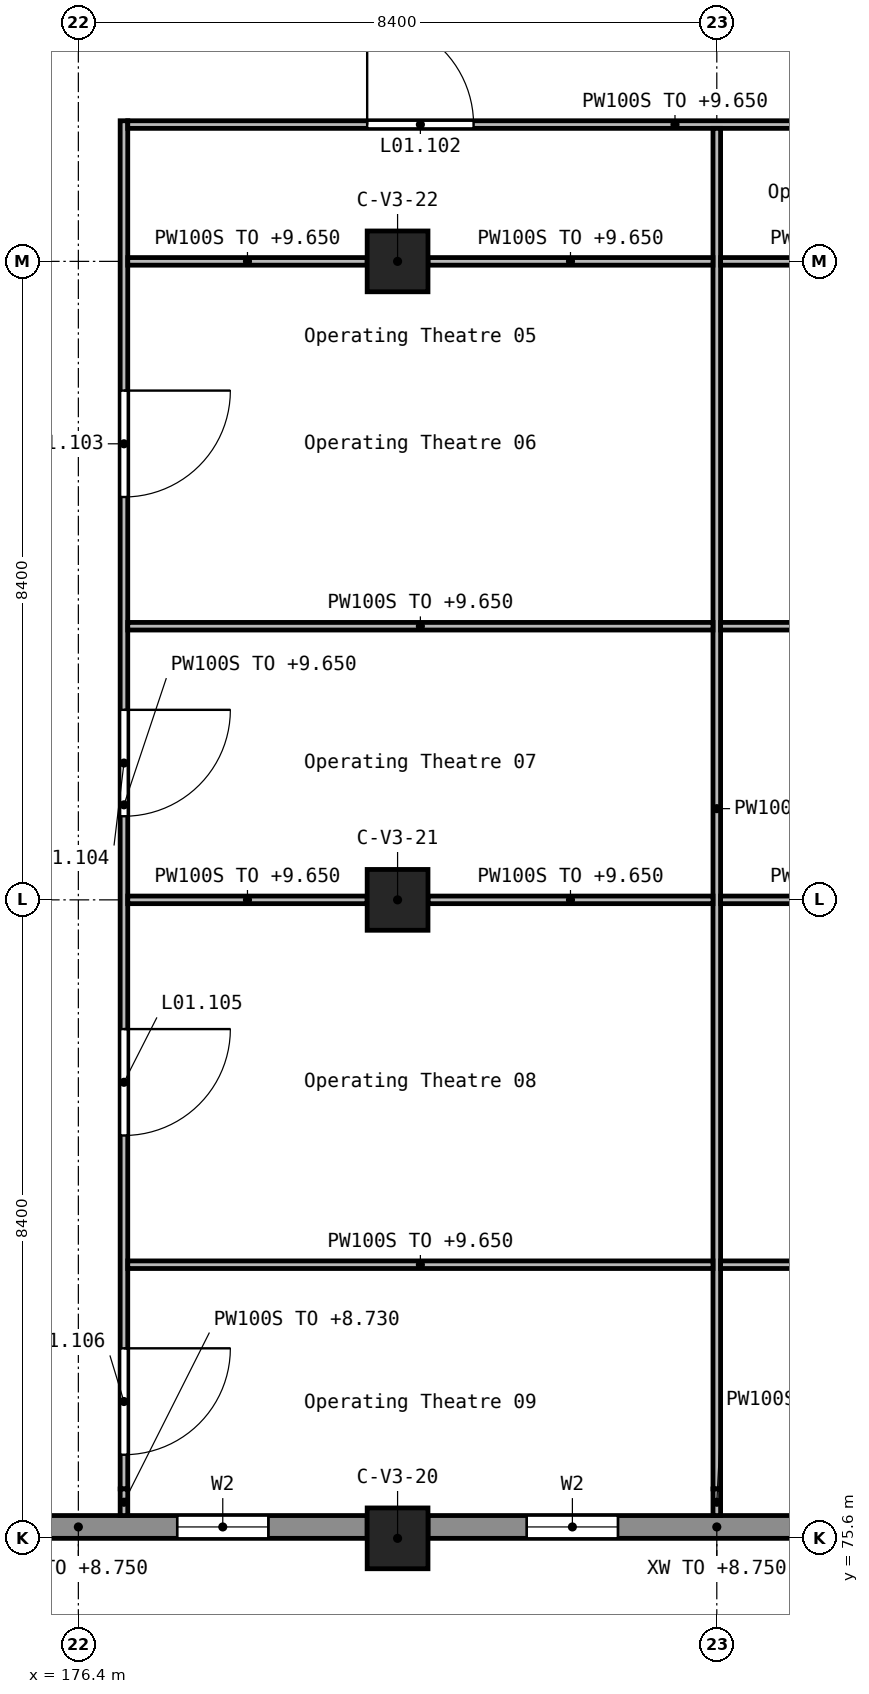
"""IFC4 building model, lengths in metres.
Left out: names, types, materials, properties, quantities, classifications, styles, units other than length and angle.
Written with IfcOpenShell. Run it as: python <this file> out.ifc"""

import sys

from ifc_helpers import new_model, si_unit, direction, frame, frame_2d, origin, origin_2d, place, context, subcontext, project, spatial, rectangle, extrude, element, fill, save


model = new_model("IFC4")
c1 = context("Model", 3, precision=1e-05, world=origin(), true_north=direction((0.0, 1.0)))
c2 = subcontext(c1, "Body", "Model", "MODEL_VIEW")
j1 = project(units=[si_unit("LENGTHUNIT", "METRE"), si_unit("PLANEANGLEUNIT", "RADIAN")], contexts=[c1])
p1 = place(None, origin())
s1 = spatial("IfcSite", under=j1, at=p1, CompositionType="ELEMENT")
p2 = place(p1, origin())
s2 = spatial("IfcBuilding", under=s1, at=p2, CompositionType="ELEMENT")
p3 = place(p2, frame((0.0, 0.0, 5.4)))
s3 = spatial("IfcBuildingStorey", under=s2, at=p3, CompositionType="ELEMENT", Elevation=5.4)
for number, where, z_axis, x_axis in (
    (1, (180.6, 75.6, 0.0), (0.0, 0.0, 1.0), (1.0, 0.0, 0.0)),
    (2, (180.6, 84.0, 0.0), (0.0, 0.0, 1.0), (1.0, 0.0, 0.0)),
    (3, (180.6, 92.4, 0.0), (0.0, 0.0, 1.0), (1.0, 0.0, 0.0)),
):
    element("IfcColumn", number, at=place(p3, frame(where, z_axis=z_axis, x_axis=x_axis)), inside=s3, PredefinedType="COLUMN", context=c2, shape_type="SweptSolid", body=[
        extrude(rectangle(XDim=0.8, YDim=0.8, at=origin_2d()), origin(), (0.0, 0.0, 1.0), 4.5),
    ])
p4 = place(p3, frame((172.6, 75.75, 0.0), z_axis=(0.0, 0.0, 1.0), x_axis=(1.0, 0.0, 0.0)))
e4 = element("IfcWall", 4, at=p4, inside=s3, PredefinedType="STANDARD", context=c2, shape_type="SweptSolid", body=[
    extrude(rectangle(XDim=7.6, YDim=0.3, at=frame_2d((3.8, 0.0))), origin(), (0.0, 0.0, 1.0), 3.35),
])
p5 = place(p4, frame((1.6, 0.0, 1.2)))
e5 = element("IfcOpeningElement", 5, at=p5, cuts=e4, PredefinedType="OPENING", context=c2, shape_type="SweptSolid", body=[
    extrude(rectangle(XDim=1.2, YDim=1.2, at=frame_2d((0.6, 0.6))), frame((0.0, 0.16, 0.0), z_axis=(0.0, -1.0, 0.0), x_axis=(1.0, 0.0, 0.0)), (0.0, 0.0, 1.0), 0.32),
])
p6 = place(p4, frame((5.1, 0.0, 1.2)))
e6 = element("IfcOpeningElement", 6, at=p6, cuts=e4, PredefinedType="OPENING", context=c2, shape_type="SweptSolid", body=[
    extrude(rectangle(XDim=1.2, YDim=1.2, at=frame_2d((0.6, 0.6))), frame((0.0, 0.16, 0.0), z_axis=(0.0, -1.0, 0.0), x_axis=(1.0, 0.0, 0.0)), (0.0, 0.0, 1.0), 0.32),
])
p7 = place(p3, frame((181.0, 75.75, 0.0), z_axis=(0.0, 0.0, 1.0), x_axis=(1.0, 0.0, 0.0)))
e7 = element("IfcWall", 7, at=p7, inside=s3, PredefinedType="STANDARD", context=c2, shape_type="SweptSolid", body=[
    extrude(rectangle(XDim=7.6, YDim=0.3, at=frame_2d((3.8, 0.0))), origin(), (0.0, 0.0, 1.0), 3.35),
])
p8 = place(p7, frame((1.3, 0.0, 1.2)))
e8 = element("IfcOpeningElement", 8, at=p8, cuts=e7, PredefinedType="OPENING", context=c2, shape_type="SweptSolid", body=[
    extrude(rectangle(XDim=1.2, YDim=1.2, at=frame_2d((0.6, 0.6))), frame((0.0, 0.16, 0.0), z_axis=(0.0, -1.0, 0.0), x_axis=(1.0, 0.0, 0.0)), (0.0, 0.0, 1.0), 0.32),
])
p9 = place(p7, frame((5.1, 0.0, 1.2)))
e9 = element("IfcOpeningElement", 9, at=p9, cuts=e7, PredefinedType="OPENING", context=c2, shape_type="SweptSolid", body=[
    extrude(rectangle(XDim=1.2, YDim=1.2, at=frame_2d((0.6, 0.6))), frame((0.0, 0.16, 0.0), z_axis=(0.0, -1.0, 0.0), x_axis=(1.0, 0.0, 0.0)), (0.0, 0.0, 1.0), 0.32),
])
p10 = place(p3, frame((177.0, 94.25, 0.0), z_axis=(0.0, 0.0, 1.0), x_axis=(0.0, -1.0, 0.0)))
e10 = element("IfcWall", 10, at=p10, inside=s3, PredefinedType="PARTITIONING", context=c2, shape_type="SweptSolid", body=[
    extrude(rectangle(XDim=18.0, YDim=0.1, at=frame_2d((9.0, 0.0))), origin(), (0.0, 0.0, 1.0), 4.25),
])
p11 = place(p10, frame((3.55, 0.0, 0.0)))
e11 = element("IfcOpeningElement", 11, at=p11, cuts=e10, PredefinedType="OPENING", context=c2, shape_type="SweptSolid", body=[
    extrude(rectangle(XDim=1.4, YDim=2.1, at=frame_2d((0.7, 1.05))), frame((0.0, 0.06, 0.0), z_axis=(0.0, -1.0, 0.0), x_axis=(1.0, 0.0, 0.0)), (0.0, 0.0, 1.0), 0.12),
])
p12 = place(p10, frame((7.75, 0.0, 0.0)))
e12 = element("IfcOpeningElement", 12, at=p12, cuts=e10, PredefinedType="OPENING", context=c2, shape_type="SweptSolid", body=[
    extrude(rectangle(XDim=1.4, YDim=2.1, at=frame_2d((0.7, 1.05))), frame((0.0, 0.06, 0.0), z_axis=(0.0, -1.0, 0.0), x_axis=(1.0, 0.0, 0.0)), (0.0, 0.0, 1.0), 0.12),
])
p13 = place(p10, frame((11.95, 0.0, 0.0)))
e13 = element("IfcOpeningElement", 13, at=p13, cuts=e10, PredefinedType="OPENING", context=c2, shape_type="SweptSolid", body=[
    extrude(rectangle(XDim=1.4, YDim=2.1, at=frame_2d((0.7, 1.05))), frame((0.0, 0.06, 0.0), z_axis=(0.0, -1.0, 0.0), x_axis=(1.0, 0.0, 0.0)), (0.0, 0.0, 1.0), 0.12),
])
p14 = place(p10, frame((16.15, 0.0, 0.0)))
e14 = element("IfcOpeningElement", 14, at=p14, cuts=e10, PredefinedType="OPENING", context=c2, shape_type="SweptSolid", body=[
    extrude(rectangle(XDim=1.4, YDim=2.1, at=frame_2d((0.7, 1.05))), frame((0.0, 0.06, 0.0), z_axis=(0.0, -1.0, 0.0), x_axis=(1.0, 0.0, 0.0)), (0.0, 0.0, 1.0), 0.12),
])
p15 = place(p3, frame((177.0, 76.25, 0.0), z_axis=(0.0, 0.0, 1.0), x_axis=(0.0, -1.0, 0.0)))
e15 = element("IfcWall", 15, at=p15, inside=s3, PredefinedType="PARTITIONING", context=c2, shape_type="SweptSolid", body=[
    extrude(rectangle(XDim=0.35, YDim=0.1, at=frame_2d((0.175, 0.0))), origin(), (0.0, 0.0, 1.0), 3.33),
])
p16 = place(p3, frame((177.05, 94.2, 0.0), z_axis=(0.0, 0.0, 1.0), x_axis=(1.0, 0.0, 0.0)))
e16 = element("IfcWall", 16, at=p16, inside=s3, PredefinedType="PARTITIONING", context=c2, shape_type="SweptSolid", body=[
    extrude(rectangle(XDim=14.4, YDim=0.1, at=frame_2d((7.2, 0.0))), origin(), (0.0, 0.0, 1.0), 4.25),
])
p17 = place(p16, frame((3.15, 0.0, 0.0)))
e17 = element("IfcOpeningElement", 17, at=p17, cuts=e16, PredefinedType="OPENING", context=c2, shape_type="SweptSolid", body=[
    extrude(rectangle(XDim=1.4, YDim=2.1, at=frame_2d((0.7, 1.05))), frame((0.0, 0.06, 0.0), z_axis=(0.0, -1.0, 0.0), x_axis=(1.0, 0.0, 0.0)), (0.0, 0.0, 1.0), 0.12),
])
p18 = place(p16, frame((10.35, 0.0, 0.0)))
e18 = element("IfcOpeningElement", 18, at=p18, cuts=e16, PredefinedType="OPENING", context=c2, shape_type="SweptSolid", body=[
    extrude(rectangle(XDim=1.4, YDim=2.1, at=frame_2d((0.7, 1.05))), frame((0.0, 0.06, 0.0), z_axis=(0.0, -1.0, 0.0), x_axis=(1.0, 0.0, 0.0)), (0.0, 0.0, 1.0), 0.12),
])
p19 = place(p3, frame((184.8, 94.15, 0.0), z_axis=(0.0, 0.0, 1.0), x_axis=(0.0, -1.0, 0.0)))
e19 = element("IfcWall", 19, at=p19, inside=s3, PredefinedType="PARTITIONING", context=c2, shape_type="SweptSolid", body=[
    extrude(rectangle(XDim=17.9, YDim=0.1, at=frame_2d((8.95, 0.0))), origin(), (0.0, 0.0, 1.0), 4.25),
])
p20 = place(p3, frame((184.8, 76.25, 0.0), z_axis=(0.0, 0.0, 1.0), x_axis=(0.0, -1.0, 0.0)))
e20 = element("IfcWall", 20, at=p20, inside=s3, PredefinedType="PARTITIONING", context=c2, shape_type="SweptSolid", body=[
    extrude(rectangle(XDim=0.35, YDim=0.1, at=frame_2d((0.175, 0.0))), origin(), (0.0, 0.0, 1.0), 3.33),
])
p21 = place(p3, frame((177.05, 79.2, 0.0), z_axis=(0.0, 0.0, 1.0), x_axis=(1.0, 0.0, 0.0)))
e21 = element("IfcWall", 21, at=p21, inside=s3, PredefinedType="PARTITIONING", context=c2, shape_type="SweptSolid", body=[
    extrude(rectangle(XDim=7.7, YDim=0.1, at=frame_2d((3.85, 0.0))), origin(), (0.0, 0.0, 1.0), 4.25),
])
p22 = place(p3, frame((184.85, 79.2, 0.0), z_axis=(0.0, 0.0, 1.0), x_axis=(1.0, 0.0, 0.0)))
e22 = element("IfcWall", 22, at=p22, inside=s3, PredefinedType="PARTITIONING", context=c2, shape_type="SweptSolid", body=[
    extrude(rectangle(XDim=6.5, YDim=0.1, at=frame_2d((3.25, 0.0))), origin(), (0.0, 0.0, 1.0), 4.25),
])
p23 = place(p3, frame((177.05, 84.0, 0.0), z_axis=(0.0, 0.0, 1.0), x_axis=(1.0, 0.0, 0.0)))
e23 = element("IfcWall", 23, at=p23, inside=s3, PredefinedType="PARTITIONING", context=c2, shape_type="SweptSolid", body=[
    extrude(rectangle(XDim=3.15, YDim=0.1, at=frame_2d((1.575, 0.0))), origin(), (0.0, 0.0, 1.0), 4.25),
])
for number, where, z_axis, x_axis in (
    (24, (181.0, 84.0, 0.0), (0.0, 0.0, 1.0), (1.0, 0.0, 0.0)),
    (25, (184.85, 84.0, 0.0), (0.0, 0.0, 1.0), (1.0, 0.0, 0.0)),
):
    element("IfcWall", number, at=place(p3, frame(where, z_axis=z_axis, x_axis=x_axis)), inside=s3, PredefinedType="PARTITIONING", context=c2, shape_type="SweptSolid", body=[
        extrude(rectangle(XDim=3.75, YDim=0.1, at=frame_2d((1.875, 0.0))), origin(), (0.0, 0.0, 1.0), 4.25),
    ])
p24 = place(p3, frame((177.05, 87.6, 0.0), z_axis=(0.0, 0.0, 1.0), x_axis=(1.0, 0.0, 0.0)))
e26 = element("IfcWall", 26, at=p24, inside=s3, PredefinedType="PARTITIONING", context=c2, shape_type="SweptSolid", body=[
    extrude(rectangle(XDim=7.7, YDim=0.1, at=frame_2d((3.85, 0.0))), origin(), (0.0, 0.0, 1.0), 4.25),
])
p25 = place(p3, frame((184.85, 87.6, 0.0), z_axis=(0.0, 0.0, 1.0), x_axis=(1.0, 0.0, 0.0)))
e27 = element("IfcWall", 27, at=p25, inside=s3, PredefinedType="PARTITIONING", context=c2, shape_type="SweptSolid", body=[
    extrude(rectangle(XDim=6.5, YDim=0.1, at=frame_2d((3.25, 0.0))), origin(), (0.0, 0.0, 1.0), 4.25),
])
p26 = place(p3, frame((177.05, 92.4, 0.0), z_axis=(0.0, 0.0, 1.0), x_axis=(1.0, 0.0, 0.0)))
e28 = element("IfcWall", 28, at=p26, inside=s3, PredefinedType="PARTITIONING", context=c2, shape_type="SweptSolid", body=[
    extrude(rectangle(XDim=3.15, YDim=0.1, at=frame_2d((1.575, 0.0))), origin(), (0.0, 0.0, 1.0), 4.25),
])
for number, where, z_axis, x_axis in (
    (29, (181.0, 92.4, 0.0), (0.0, 0.0, 1.0), (1.0, 0.0, 0.0)),
    (30, (184.85, 92.4, 0.0), (0.0, 0.0, 1.0), (1.0, 0.0, 0.0)),
):
    element("IfcWall", number, at=place(p3, frame(where, z_axis=z_axis, x_axis=x_axis)), inside=s3, PredefinedType="PARTITIONING", context=c2, shape_type="SweptSolid", body=[
        extrude(rectangle(XDim=3.75, YDim=0.1, at=frame_2d((1.875, 0.0))), origin(), (0.0, 0.0, 1.0), 4.25),
    ])
p27 = place(p6, origin())
e31 = element("IfcWindow", 31, at=p27, inside=s3, PartitioningType="SINGLE_PANEL", PredefinedType="WINDOW", context=c2, shape_type="SweptSolid", body=[
    extrude(rectangle(XDim=1.2, YDim=1.2, at=frame_2d((0.6, 0.6))), frame((0.0, 0.03, 0.0), z_axis=(0.0, -1.0, 0.0), x_axis=(1.0, 0.0, 0.0)), (0.0, 0.0, 1.0), 0.06),
])
fill(e6, e31)
p28 = place(p8, origin())
e32 = element("IfcWindow", 32, at=p28, inside=s3, PartitioningType="SINGLE_PANEL", PredefinedType="WINDOW", context=c2, shape_type="SweptSolid", body=[
    extrude(rectangle(XDim=1.2, YDim=1.2, at=frame_2d((0.6, 0.6))), frame((0.0, 0.03, 0.0), z_axis=(0.0, -1.0, 0.0), x_axis=(1.0, 0.0, 0.0)), (0.0, 0.0, 1.0), 0.06),
])
fill(e8, e32)
p29 = place(p17, frame((1.4, 0.0, 0.0), z_axis=(0.0, 0.0, 1.0), x_axis=(-1.0, 0.0, 0.0)))
e33 = element("IfcDoor", 33, at=p29, inside=s3, OperationType="DOUBLE_DOOR_SINGLE_SWING", PredefinedType="DOOR", context=c2, shape_type="SweptSolid", body=[
    extrude(rectangle(XDim=1.4, YDim=2.1, at=frame_2d((0.7, 1.05))), frame((0.0, 0.025, 0.0), z_axis=(0.0, -1.0, 0.0), x_axis=(1.0, 0.0, 0.0)), (0.0, 0.0, 1.0), 0.05),
])
fill(e17, e33)
p30 = place(p11, origin())
e34 = element("IfcDoor", 34, at=p30, inside=s3, OperationType="DOUBLE_DOOR_SINGLE_SWING", PredefinedType="DOOR", context=c2, shape_type="SweptSolid", body=[
    extrude(rectangle(XDim=1.4, YDim=2.1, at=frame_2d((0.7, 1.05))), frame((0.0, 0.025, 0.0), z_axis=(0.0, -1.0, 0.0), x_axis=(1.0, 0.0, 0.0)), (0.0, 0.0, 1.0), 0.05),
])
fill(e11, e34)
p31 = place(p12, origin())
e35 = element("IfcDoor", 35, at=p31, inside=s3, OperationType="DOUBLE_DOOR_SINGLE_SWING", PredefinedType="DOOR", context=c2, shape_type="SweptSolid", body=[
    extrude(rectangle(XDim=1.4, YDim=2.1, at=frame_2d((0.7, 1.05))), frame((0.0, 0.025, 0.0), z_axis=(0.0, -1.0, 0.0), x_axis=(1.0, 0.0, 0.0)), (0.0, 0.0, 1.0), 0.05),
])
fill(e12, e35)
p32 = place(p13, origin())
e36 = element("IfcDoor", 36, at=p32, inside=s3, OperationType="DOUBLE_DOOR_SINGLE_SWING", PredefinedType="DOOR", context=c2, shape_type="SweptSolid", body=[
    extrude(rectangle(XDim=1.4, YDim=2.1, at=frame_2d((0.7, 1.05))), frame((0.0, 0.025, 0.0), z_axis=(0.0, -1.0, 0.0), x_axis=(1.0, 0.0, 0.0)), (0.0, 0.0, 1.0), 0.05),
])
fill(e13, e36)
p33 = place(p14, origin())
e37 = element("IfcDoor", 37, at=p33, inside=s3, OperationType="DOUBLE_DOOR_SINGLE_SWING", PredefinedType="DOOR", context=c2, shape_type="SweptSolid", body=[
    extrude(rectangle(XDim=1.4, YDim=2.1, at=frame_2d((0.7, 1.05))), frame((0.0, 0.025, 0.0), z_axis=(0.0, -1.0, 0.0), x_axis=(1.0, 0.0, 0.0)), (0.0, 0.0, 1.0), 0.05),
])
fill(e14, e37)
save(model, sys.argv[1])
